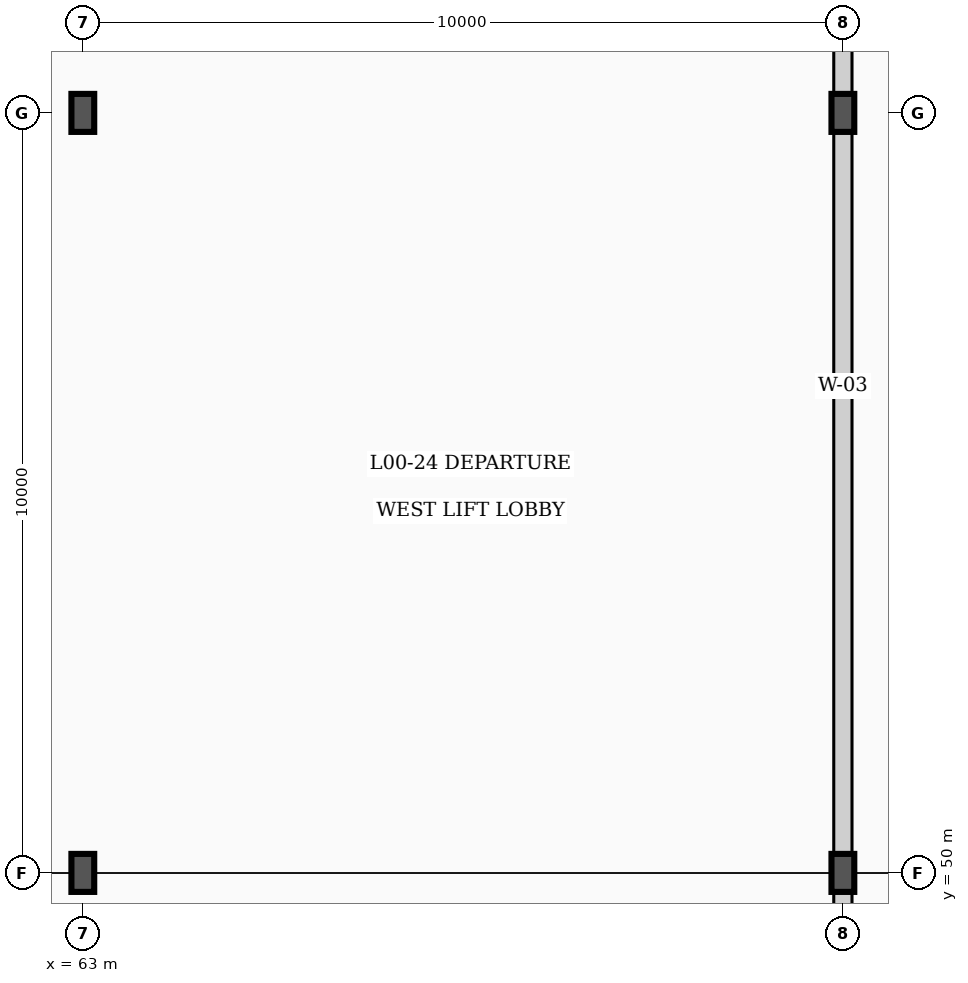
"""IFC4 building model, lengths in metres.
Left out: names, types, materials, properties, quantities, classifications, styles, units other than length and angle.
Written with IfcOpenShell. Run it as: python <this file> out.ifc"""

import sys

from ifc_helpers import new_model, si_unit, direction, frame, frame_2d, origin, origin_2d, place, context, subcontext, project, spatial, rectangle, i_section, extrude, element, save


model = new_model("IFC4")
c1 = context("Model", 3, precision=1e-05, world=origin(), true_north=direction((0.0, 1.0)))
c2 = subcontext(c1, "Body", "Model", "MODEL_VIEW")
j1 = project(units=[si_unit("LENGTHUNIT", "METRE"), si_unit("PLANEANGLEUNIT", "RADIAN")], contexts=[c1])
p1 = place(None, origin())
s1 = spatial("IfcSite", under=j1, at=p1, CompositionType="ELEMENT")
p2 = place(p1, origin())
s2 = spatial("IfcBuilding", under=s1, at=p2, CompositionType="ELEMENT")
p3 = place(p2, origin())
s3 = spatial("IfcBuildingStorey", under=s2, at=p3, CompositionType="ELEMENT", Elevation=0.0)
for number, where, z_axis, x_axis in (
    (1, (63.0, 50.0, 0.0), (0.0, 0.0, 1.0), (1.0, 0.0, 0.0)),
    (2, (63.0, 60.0, 0.0), (0.0, 0.0, 1.0), (1.0, 0.0, 0.0)),
    (3, (73.0, 50.0, 0.0), (0.0, 0.0, 1.0), (1.0, 0.0, 0.0)),
    (4, (73.0, 60.0, 0.0), (0.0, 0.0, 1.0), (1.0, 0.0, 0.0)),
):
    element("IfcColumn", number, at=place(p3, frame(where, z_axis=z_axis, x_axis=x_axis)), inside=s3, PredefinedType="COLUMN", context=c2, shape_type="SweptSolid", body=[
        extrude(i_section(OverallWidth=0.3, OverallDepth=0.5, WebThickness=0.014, FlangeThickness=0.028, FilletRadius=0.027, at=origin_2d()), origin(), (0.0, 0.0, 1.0), 5.4),
    ])
p4 = place(p3, frame((73.0, 20.8, 0.0), z_axis=(0.0, 0.0, 1.0), x_axis=(0.0, 1.0, 0.0)))
e5 = element("IfcWall", 5, at=p4, inside=s3, PredefinedType="PARTITIONING", context=c2, shape_type="SweptSolid", body=[
    extrude(rectangle(XDim=78.4, YDim=0.24, at=frame_2d((39.2, 0.0))), origin(), (0.0, 0.0, 1.0), 4.55),
])
p5 = place(p4, frame((14.371, 0.0, 0.0)))
e6 = element("IfcOpeningElement", 6, at=p5, cuts=e5, PredefinedType="OPENING", context=c2, shape_type="SweptSolid", body=[
    extrude(rectangle(XDim=1.05, YDim=2.45, at=frame_2d((0.525, 1.225))), frame((0.0, 0.13, 0.0), z_axis=(0.0, -1.0, 0.0), x_axis=(1.0, 0.0, 0.0)), (0.0, 0.0, 1.0), 0.26),
])
p6 = place(p4, frame((53.571, 0.0, 0.0)))
e7 = element("IfcOpeningElement", 7, at=p6, cuts=e5, PredefinedType="OPENING", context=c2, shape_type="SweptSolid", body=[
    extrude(rectangle(XDim=1.05, YDim=2.45, at=frame_2d((0.525, 1.225))), frame((0.0, 0.13, 0.0), z_axis=(0.0, -1.0, 0.0), x_axis=(1.0, 0.0, 0.0)), (0.0, 0.0, 1.0), 0.26),
])
save(model, sys.argv[1])
